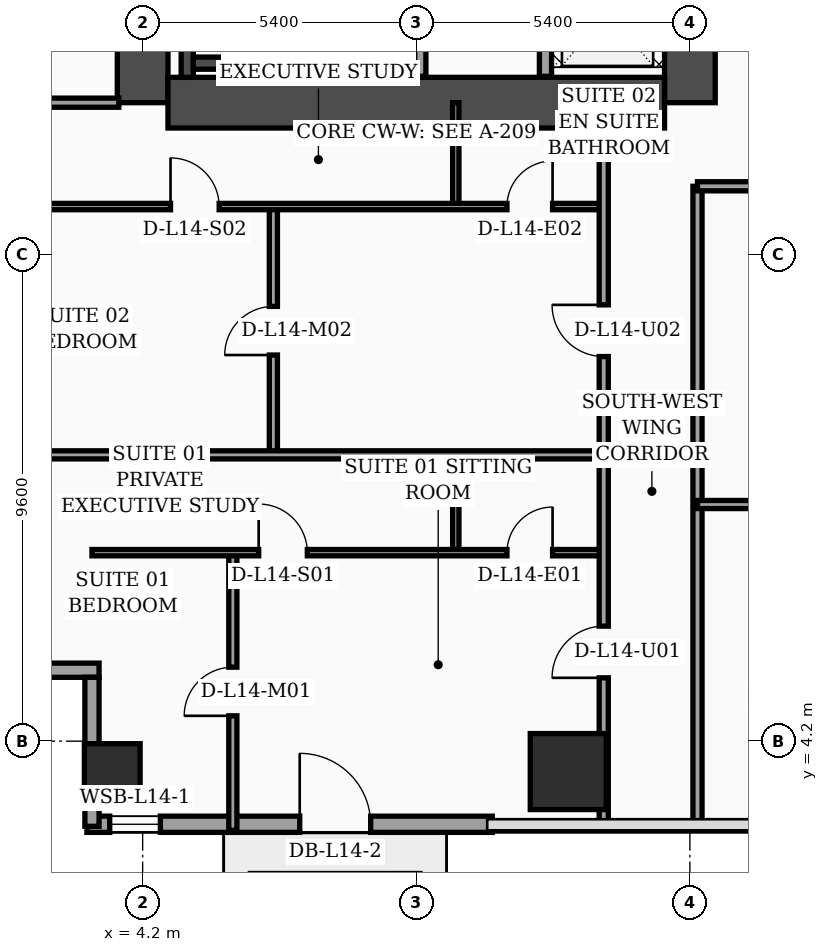
"""IFC4 building model, lengths in metres.
Left out: names, types, materials, properties, quantities, classifications, styles, units other than length and angle.
Written with IfcOpenShell. Run it as: python <this file> out.ifc"""

import sys

from ifc_helpers import new_model, si_unit, direction, frame, frame_2d, origin, origin_2d, place, context, subcontext, project, spatial, rectangle, hollow_rectangle, extrude, element, fill, save


model = new_model("IFC4")
c1 = context("Model", 3, precision=1e-05, world=origin(), true_north=direction((0.0, 1.0)))
c2 = subcontext(c1, "Body", "Model", "MODEL_VIEW")
j1 = project(units=[si_unit("LENGTHUNIT", "METRE"), si_unit("PLANEANGLEUNIT", "RADIAN")], contexts=[c1])
p1 = place(None, origin())
s1 = spatial("IfcSite", under=j1, at=p1, CompositionType="ELEMENT")
p2 = place(p1, origin())
s2 = spatial("IfcBuilding", under=s1, at=p2, CompositionType="ELEMENT")
p3 = place(p2, frame((0.0, 0.0, 62.2)))
s3 = spatial("IfcBuildingStorey", under=s2, at=p3, CompositionType="ELEMENT", Elevation=62.2)
p4 = place(p3, frame((4.2, 16.8, 0.0), z_axis=(0.0, 0.0, 1.0), x_axis=(0.0, 1.0, 0.0)))
e1 = element("IfcWall", 1, at=p4, inside=s3, PredefinedType="SHEAR", context=c2, shape_type="SweptSolid", body=[
    extrude(rectangle(XDim=21.6, YDim=1.0, at=frame_2d((10.8, 0.0))), origin(), (0.0, 0.0, 1.0), 3.56),
])
p5 = place(p3, frame((15.0, 16.8, 0.0), z_axis=(0.0, 0.0, 1.0), x_axis=(0.0, 1.0, 0.0)))
e2 = element("IfcWall", 2, at=p5, inside=s3, PredefinedType="SHEAR", context=c2, shape_type="SweptSolid", body=[
    extrude(rectangle(XDim=21.6, YDim=1.0, at=frame_2d((10.8, 0.0))), origin(), (0.0, 0.0, 1.0), 3.56),
])
p6 = place(p5, frame((8.65, 0.0, 0.0)))
e3 = element("IfcOpeningElement", 3, at=p6, cuts=e2, PredefinedType="OPENING", context=c2, shape_type="SweptSolid", body=[
    extrude(rectangle(XDim=1.1, YDim=2.2, at=frame_2d((0.55, 1.1))), frame((0.0, 0.51, 0.0), z_axis=(0.0, -1.0, 0.0), x_axis=(1.0, 0.0, 0.0)), (0.0, 0.0, 1.0), 1.02),
])
p7 = place(p5, frame((1.25, 0.0, 0.0)))
e4 = element("IfcOpeningElement", 4, at=p7, cuts=e2, PredefinedType="OPENING", context=c2, shape_type="SweptSolid", body=[
    extrude(rectangle(XDim=1.1, YDim=2.2, at=frame_2d((0.55, 1.1))), frame((0.0, 0.51, 0.0), z_axis=(0.0, -1.0, 0.0), x_axis=(1.0, 0.0, 0.0)), (0.0, 0.0, 1.0), 1.02),
])
p8 = place(p5, frame((3.8, 0.0, 0.0)))
e5 = element("IfcOpeningElement", 5, at=p8, cuts=e2, PredefinedType="OPENING", context=c2, shape_type="SweptSolid", body=[
    extrude(rectangle(XDim=1.1, YDim=2.2, at=frame_2d((0.55, 1.1))), frame((0.0, 0.51, 0.0), z_axis=(0.0, -1.0, 0.0), x_axis=(1.0, 0.0, 0.0)), (0.0, 0.0, 1.0), 1.02),
])
p9 = place(p5, frame((6.35, 0.0, 0.0)))
e6 = element("IfcOpeningElement", 6, at=p9, cuts=e2, PredefinedType="OPENING", context=c2, shape_type="SweptSolid", body=[
    extrude(rectangle(XDim=1.1, YDim=2.2, at=frame_2d((0.55, 1.1))), frame((0.0, 0.51, 0.0), z_axis=(0.0, -1.0, 0.0), x_axis=(1.0, 0.0, 0.0)), (0.0, 0.0, 1.0), 1.02),
])
p10 = place(p3, frame((4.7, 16.8, 0.0), z_axis=(0.0, 0.0, 1.0), x_axis=(1.0, 0.0, 0.0)))
e7 = element("IfcWall", 7, at=p10, inside=s3, PredefinedType="SHEAR", context=c2, shape_type="SweptSolid", body=[
    extrude(rectangle(XDim=9.8, YDim=1.0, at=frame_2d((4.9, 0.0))), origin(), (0.0, 0.0, 1.0), 3.56),
])
p11 = place(p3, frame((5.08, 17.3, 0.0), z_axis=(0.0, 0.0, 1.0), x_axis=(0.0, 1.0, 0.0)))
e8 = element("IfcWall", 8, at=p11, inside=s3, PredefinedType="SOLIDWALL", context=c2, shape_type="SweptSolid", body=[
    extrude(rectangle(XDim=9.49, YDim=0.24, at=frame_2d((4.745, 0.0))), origin(), (0.0, 0.0, 1.0), 3.56),
])
p12 = place(p3, frame((8.42, 17.3, 0.0), z_axis=(0.0, 0.0, 1.0), x_axis=(0.0, 1.0, 0.0)))
e9 = element("IfcWall", 9, at=p12, inside=s3, PredefinedType="SOLIDWALL", context=c2, shape_type="SweptSolid", body=[
    extrude(rectangle(XDim=9.49, YDim=0.24, at=frame_2d((4.745, 0.0))), origin(), (0.0, 0.0, 1.0), 3.56),
])
p13 = place(p12, frame((0.35, 0.0, 0.0)))
e10 = element("IfcOpeningElement", 10, at=p13, cuts=e9, PredefinedType="OPENING", context=c2, shape_type="SweptSolid", body=[
    extrude(rectangle(XDim=1.15, YDim=2.2, at=frame_2d((0.575, 1.1))), frame((0.0, 0.13, 0.0), z_axis=(0.0, -1.0, 0.0), x_axis=(1.0, 0.0, 0.0)), (0.0, 0.0, 1.0), 0.26),
])
p14 = place(p3, frame((5.2, 17.58, 0.0), z_axis=(0.0, 0.0, 1.0), x_axis=(1.0, 0.0, 0.0)))
e11 = element("IfcWall", 11, at=p14, inside=s3, PredefinedType="SOLIDWALL", context=c2, shape_type="SweptSolid", body=[
    extrude(rectangle(XDim=3.1, YDim=0.24, at=frame_2d((1.55, 0.0))), origin(), (0.0, 0.0, 1.0), 3.56),
])
p15 = place(p3, frame((3.6, 3.6, 0.0), z_axis=(0.0, 0.0, 1.0), x_axis=(1.0, 0.0, 0.0)))
e12 = element("IfcColumn", 12, at=p15, inside=s3, PredefinedType="COLUMN", context=c2, shape_type="SweptSolid", body=[
    extrude(hollow_rectangle(XDim=1.1, YDim=1.1, WallThickness=0.045, at=origin_2d()), origin(), (0.0, 0.0, 1.0), 3.56),
])
p16 = place(p3, frame((12.6, 3.6, 0.0), z_axis=(0.0, 0.0, 1.0), x_axis=(1.0, 0.0, 0.0)))
e13 = element("IfcColumn", 13, at=p16, inside=s3, PredefinedType="COLUMN", context=c2, shape_type="SweptSolid", body=[
    extrude(rectangle(XDim=1.5, YDim=1.5, at=origin_2d()), origin(), (0.0, 0.0, 1.0), 3.56),
])
p17 = place(p3, frame((3.1, 2.56, 0.0), z_axis=(0.0, 0.0, 1.0), x_axis=(1.0, 0.0, 0.0)))
e14 = element("IfcWall", 14, at=p17, inside=s3, PredefinedType="SOLIDWALL", context=c2, shape_type="SweptSolid", body=[
    extrude(rectangle(XDim=8.0, YDim=0.32, at=frame_2d((4.0, 0.0))), origin(), (0.0, 0.0, 1.0), 3.56),
])
p18 = place(p17, frame((0.45, 0.0, 0.75)))
e15 = element("IfcOpeningElement", 15, at=p18, cuts=e14, PredefinedType="OPENING", context=c2, shape_type="SweptSolid", body=[
    extrude(rectangle(XDim=1.0, YDim=1.6, at=frame_2d((0.5, 0.8))), frame((0.0, 0.17, 0.0), z_axis=(0.0, -1.0, 0.0), x_axis=(1.0, 0.0, 0.0)), (0.0, 0.0, 1.0), 0.34),
])
p19 = place(p17, frame((4.2, 0.0, 0.0)))
e16 = element("IfcOpeningElement", 16, at=p19, cuts=e14, PredefinedType="OPENING", context=c2, shape_type="SweptSolid", body=[
    extrude(rectangle(XDim=1.4, YDim=2.25, at=frame_2d((0.7, 1.125))), frame((0.0, 0.17, 0.0), z_axis=(0.0, -1.0, 0.0), x_axis=(1.0, 0.0, 0.0)), (0.0, 0.0, 1.0), 0.34),
])
p20 = place(p3, frame((0.12, 5.6, 0.0), z_axis=(0.0, 0.0, 1.0), x_axis=(1.0, 0.0, 0.0)))
e17 = element("IfcWall", 17, at=p20, inside=s3, PredefinedType="SOLIDWALL", context=c2, shape_type="SweptSolid", body=[
    extrude(rectangle(XDim=3.22, YDim=0.28, at=frame_2d((1.61, 0.0))), origin(), (0.0, 0.0, 1.0), 2.84),
])
p21 = place(p3, frame((3.2, 5.46, 0.0), z_axis=(0.0, 0.0, 1.0), x_axis=(0.0, -1.0, 0.0)))
e18 = element("IfcWall", 18, at=p21, inside=s3, PredefinedType="SOLIDWALL", context=c2, shape_type="SweptSolid", body=[
    extrude(rectangle(XDim=2.94, YDim=0.28, at=frame_2d((1.47, 0.0))), origin(), (0.0, 0.0, 1.0), 2.84),
])
p22 = place(p3, frame((9.68, 17.32, 0.0), z_axis=(0.0, 0.0, 1.0), x_axis=(0.0, 1.0, 0.0)))
e19 = element("IfcWall", 19, at=p22, inside=s3, PredefinedType="SOLIDWALL", context=c2, shape_type="SweptSolid", body=[
    extrude(rectangle(XDim=7.68, YDim=0.22, at=frame_2d((3.84, 0.0))), origin(), (0.0, 0.0, 1.0), 3.56),
])
p23 = place(p3, frame((12.15, 17.32, 0.0), z_axis=(0.0, 0.0, 1.0), x_axis=(0.0, 1.0, 0.0)))
e20 = element("IfcWall", 20, at=p23, inside=s3, PredefinedType="SOLIDWALL", context=c2, shape_type="SweptSolid", body=[
    extrude(rectangle(XDim=7.65, YDim=0.24, at=frame_2d((3.825, 0.0))), origin(), (0.0, 0.0, 1.0), 3.56),
])
p24 = place(p3, frame((0.08, 16.8, 0.0), z_axis=(0.0, 0.0, 1.0), x_axis=(1.0, 0.0, 0.0)))
e21 = element("IfcWall", 21, at=p24, inside=s3, PredefinedType="PARTITIONING", context=c2, shape_type="SweptSolid", body=[
    extrude(rectangle(XDim=3.65, YDim=0.18, at=frame_2d((1.825, 0.0))), origin(), (0.0, 0.0, 1.0), 2.84),
])
p25 = place(p3, frame((10.38, 7.92, 0.0), z_axis=(0.0, 0.0, 1.0), x_axis=(0.0, 1.0, 0.0)))
e22 = element("IfcWall", 22, at=p25, inside=s3, PredefinedType="PARTITIONING", context=c2, shape_type="SweptSolid", body=[
    extrude(rectangle(XDim=1.93, YDim=0.125, at=frame_2d((0.965, 0.0))), origin(), (0.0, 0.0, 1.0), 3.56),
])
p26 = place(p3, frame((5.98, 2.44, 0.0), z_axis=(0.0, 0.0, 1.0), x_axis=(0.0, 1.0, 0.0)))
e23 = element("IfcWall", 23, at=p26, inside=s3, PredefinedType="PARTITIONING", context=c2, shape_type="SweptSolid", body=[
    extrude(rectangle(XDim=5.48, YDim=0.16, at=frame_2d((2.74, 0.0))), origin(), (0.0, 0.0, 1.0), 3.04),
])
p27 = place(p26, frame((2.26, 0.0, 0.0)))
e24 = element("IfcOpeningElement", 24, at=p27, cuts=e23, PredefinedType="OPENING", context=c2, shape_type="SweptSolid", body=[
    extrude(rectangle(XDim=0.96, YDim=2.2, at=frame_2d((0.48, 1.1))), frame((0.0, 0.09, 0.0), z_axis=(0.0, -1.0, 0.0), x_axis=(1.0, 0.0, 0.0)), (0.0, 0.0, 1.0), 0.18),
])
p28 = place(p3, frame((3.2, 7.92, 0.0), z_axis=(0.0, 0.0, 1.0), x_axis=(1.0, 0.0, 0.0)))
e25 = element("IfcWall", 25, at=p28, inside=s3, PredefinedType="PARTITIONING", context=c2, shape_type="SweptSolid", body=[
    extrude(rectangle(XDim=10.1, YDim=0.125, at=frame_2d((5.05, 0.0))), origin(), (0.0, 0.0, 1.0), 2.84),
])
p29 = place(p28, frame((3.29, 0.0, 0.0)))
e26 = element("IfcOpeningElement", 26, at=p29, cuts=e25, PredefinedType="OPENING", context=c2, shape_type="SweptSolid", body=[
    extrude(rectangle(XDim=0.96, YDim=2.2, at=frame_2d((0.48, 1.1))), frame((0.0, 0.073, 0.0), z_axis=(0.0, -1.0, 0.0), x_axis=(1.0, 0.0, 0.0)), (0.0, 0.0, 1.0), 0.145),
])
p30 = place(p28, frame((8.19, 0.0, 0.0)))
e27 = element("IfcOpeningElement", 27, at=p30, cuts=e25, PredefinedType="OPENING", context=c2, shape_type="SweptSolid", body=[
    extrude(rectangle(XDim=0.9, YDim=2.15, at=frame_2d((0.45, 1.075))), frame((0.0, 0.073, 0.0), z_axis=(0.0, -1.0, 0.0), x_axis=(1.0, 0.0, 0.0)), (0.0, 0.0, 1.0), 0.145),
])
p31 = place(p3, frame((10.38, 14.75, 0.0), z_axis=(0.0, 0.0, 1.0), x_axis=(0.0, 1.0, 0.0)))
e28 = element("IfcWall", 28, at=p31, inside=s3, PredefinedType="PARTITIONING", context=c2, shape_type="SweptSolid", body=[
    extrude(rectangle(XDim=2.05, YDim=0.125, at=frame_2d((1.025, 0.0))), origin(), (0.0, 0.0, 1.0), 3.56),
])
p32 = place(p3, frame((6.78, 9.85, 0.0), z_axis=(0.0, 0.0, 1.0), x_axis=(0.0, 1.0, 0.0)))
e29 = element("IfcWall", 29, at=p32, inside=s3, PredefinedType="PARTITIONING", context=c2, shape_type="SweptSolid", body=[
    extrude(rectangle(XDim=4.9, YDim=0.16, at=frame_2d((2.45, 0.0))), origin(), (0.0, 0.0, 1.0), 3.14),
])
p33 = place(p32, frame((1.97, 0.0, 0.0)))
e30 = element("IfcOpeningElement", 30, at=p33, cuts=e29, PredefinedType="OPENING", context=c2, shape_type="SweptSolid", body=[
    extrude(rectangle(XDim=0.96, YDim=2.2, at=frame_2d((0.48, 1.1))), frame((0.0, 0.09, 0.0), z_axis=(0.0, -1.0, 0.0), x_axis=(1.0, 0.0, 0.0)), (0.0, 0.0, 1.0), 0.18),
])
p34 = place(p3, frame((0.08, 14.75, 0.0), z_axis=(0.0, 0.0, 1.0), x_axis=(1.0, 0.0, 0.0)))
e31 = element("IfcWall", 31, at=p34, inside=s3, PredefinedType="PARTITIONING", context=c2, shape_type="SweptSolid", body=[
    extrude(rectangle(XDim=13.22, YDim=0.125, at=frame_2d((6.61, 0.0))), origin(), (0.0, 0.0, 1.0), 2.84),
])
p35 = place(p34, frame((4.67, 0.0, 0.0)))
e32 = element("IfcOpeningElement", 32, at=p35, cuts=e31, PredefinedType="OPENING", context=c2, shape_type="SweptSolid", body=[
    extrude(rectangle(XDim=0.96, YDim=2.2, at=frame_2d((0.48, 1.1))), frame((0.0, 0.073, 0.0), z_axis=(0.0, -1.0, 0.0), x_axis=(1.0, 0.0, 0.0)), (0.0, 0.0, 1.0), 0.145),
])
p36 = place(p34, frame((11.31, 0.0, 0.0)))
e33 = element("IfcOpeningElement", 33, at=p36, cuts=e31, PredefinedType="OPENING", context=c2, shape_type="SweptSolid", body=[
    extrude(rectangle(XDim=0.9, YDim=2.15, at=frame_2d((0.45, 1.075))), frame((0.0, 0.073, 0.0), z_axis=(0.0, -1.0, 0.0), x_axis=(1.0, 0.0, 0.0)), (0.0, 0.0, 1.0), 0.145),
])
p37 = place(p3, frame((0.08, 9.85, 0.0), z_axis=(0.0, 0.0, 1.0), x_axis=(1.0, 0.0, 0.0)))
e34 = element("IfcWall", 34, at=p37, inside=s3, PredefinedType="PARTITIONING", context=c2, shape_type="SweptSolid", body=[
    extrude(rectangle(XDim=13.22, YDim=0.16, at=frame_2d((6.61, 0.0))), origin(), (0.0, 0.0, 1.0), 2.84),
])
p38 = place(p3, frame((13.3, 2.44, 0.0), z_axis=(0.0, 0.0, 1.0), x_axis=(0.0, 1.0, 0.0)))
e35 = element("IfcWall", 35, at=p38, inside=s3, PredefinedType="PARTITIONING", context=c2, shape_type="SweptSolid", body=[
    extrude(rectangle(XDim=14.36, YDim=0.18, at=frame_2d((7.18, 0.0))), origin(), (0.0, 0.0, 1.0), 3.04),
])
p39 = place(p38, frame((3.01, 0.0, 0.0)))
e36 = element("IfcOpeningElement", 36, at=p39, cuts=e35, PredefinedType="OPENING", context=c2, shape_type="SweptSolid", body=[
    extrude(rectangle(XDim=1.02, YDim=2.2, at=frame_2d((0.51, 1.1))), frame((0.0, 0.1, 0.0), z_axis=(0.0, -1.0, 0.0), x_axis=(1.0, 0.0, 0.0)), (0.0, 0.0, 1.0), 0.2),
])
p40 = place(p38, frame((9.35, 0.0, 0.0)))
e37 = element("IfcOpeningElement", 37, at=p40, cuts=e35, PredefinedType="OPENING", context=c2, shape_type="SweptSolid", body=[
    extrude(rectangle(XDim=1.02, YDim=2.2, at=frame_2d((0.51, 1.1))), frame((0.0, 0.1, 0.0), z_axis=(0.0, -1.0, 0.0), x_axis=(1.0, 0.0, 0.0)), (0.0, 0.0, 1.0), 0.2),
])
p41 = place(p3, frame((15.15, 2.44, 0.0), z_axis=(0.0, 0.0, 1.0), x_axis=(0.0, 1.0, 0.0)))
e38 = element("IfcWall", 38, at=p41, inside=s3, PredefinedType="PARTITIONING", context=c2, shape_type="SweptSolid", body=[
    extrude(rectangle(XDim=12.71, YDim=0.18, at=frame_2d((6.355, 0.0))), origin(), (0.0, 0.0, 1.0), 3.04),
])
p42 = place(p3, frame((15.15, 8.87, 0.0), z_axis=(0.0, 0.0, 1.0), x_axis=(1.0, 0.0, 0.0)))
e39 = element("IfcWall", 39, at=p42, inside=s3, PredefinedType="PARTITIONING", context=c2, shape_type="SweptSolid", body=[
    extrude(rectangle(XDim=4.45, YDim=0.16, at=frame_2d((2.225, 0.0))), origin(), (0.0, 0.0, 1.0), 3.56),
])
p43 = place(p42, frame((1.75, 0.0, 0.0)))
e40 = element("IfcOpeningElement", 40, at=p43, cuts=e39, PredefinedType="OPENING", context=c2, shape_type="SweptSolid", body=[
    extrude(rectangle(XDim=0.96, YDim=2.2, at=frame_2d((0.48, 1.1))), frame((0.0, 0.09, 0.0), z_axis=(0.0, -1.0, 0.0), x_axis=(1.0, 0.0, 0.0)), (0.0, 0.0, 1.0), 0.18),
])
p44 = place(p3, frame((15.15, 15.15, 0.0), z_axis=(0.0, 0.0, 1.0), x_axis=(1.0, 0.0, 0.0)))
e41 = element("IfcWall", 41, at=p44, inside=s3, PredefinedType="PARTITIONING", context=c2, shape_type="SweptSolid", body=[
    extrude(rectangle(XDim=6.45, YDim=0.18, at=frame_2d((3.225, 0.0))), origin(), (0.0, 0.0, 1.0), 2.34),
])
p45 = place(p44, frame((1.74, 0.0, 0.0)))
e42 = element("IfcOpeningElement", 42, at=p45, cuts=e41, PredefinedType="OPENING", context=c2, shape_type="SweptSolid", body=[
    extrude(rectangle(XDim=1.02, YDim=2.2, at=frame_2d((0.51, 1.1))), frame((0.0, 0.1, 0.0), z_axis=(0.0, -1.0, 0.0), x_axis=(1.0, 0.0, 0.0)), (0.0, 0.0, 1.0), 0.2),
])
p46 = place(p18, origin())
e43 = element("IfcWindow", 43, at=p46, inside=s3, PartitioningType="SINGLE_PANEL", PredefinedType="WINDOW", context=c2, shape_type="SweptSolid", body=[
    extrude(rectangle(XDim=1.0, YDim=1.6, at=frame_2d((0.5, 0.8))), frame((0.0, 0.03, 0.0), z_axis=(0.0, -1.0, 0.0), x_axis=(1.0, 0.0, 0.0)), (0.0, 0.0, 1.0), 0.06),
])
fill(e15, e43)
p47 = place(p19, origin())
e44 = element("IfcDoor", 44, at=p47, inside=s3, OperationType="SINGLE_SWING_LEFT", PredefinedType="DOOR", context=c2, shape_type="SweptSolid", body=[
    extrude(rectangle(XDim=1.4, YDim=2.25, at=frame_2d((0.7, 1.125))), frame((0.0, 0.025, 0.0), z_axis=(0.0, -1.0, 0.0), x_axis=(1.0, 0.0, 0.0)), (0.0, 0.0, 1.0), 0.05),
])
fill(e16, e44)
p48 = place(p27, origin())
e45 = element("IfcDoor", 45, at=p48, inside=s3, OperationType="SINGLE_SWING_LEFT", PredefinedType="DOOR", context=c2, shape_type="SweptSolid", body=[
    extrude(rectangle(XDim=0.96, YDim=2.2, at=frame_2d((0.48, 1.1))), frame((0.0, 0.025, 0.0), z_axis=(0.0, -1.0, 0.0), x_axis=(1.0, 0.0, 0.0)), (0.0, 0.0, 1.0), 0.05),
])
fill(e24, e45)
p49 = place(p29, origin())
e46 = element("IfcDoor", 46, at=p49, inside=s3, OperationType="SINGLE_SWING_LEFT", PredefinedType="DOOR", context=c2, shape_type="SweptSolid", body=[
    extrude(rectangle(XDim=0.96, YDim=2.2, at=frame_2d((0.48, 1.1))), frame((0.0, 0.025, 0.0), z_axis=(0.0, -1.0, 0.0), x_axis=(1.0, 0.0, 0.0)), (0.0, 0.0, 1.0), 0.05),
])
fill(e26, e46)
p50 = place(p30, origin())
e47 = element("IfcDoor", 47, at=p50, inside=s3, OperationType="SINGLE_SWING_RIGHT", PredefinedType="DOOR", context=c2, shape_type="SweptSolid", body=[
    extrude(rectangle(XDim=0.9, YDim=2.15, at=frame_2d((0.45, 1.075))), frame((0.0, 0.025, 0.0), z_axis=(0.0, -1.0, 0.0), x_axis=(1.0, 0.0, 0.0)), (0.0, 0.0, 1.0), 0.05),
])
fill(e27, e47)
p51 = place(p33, origin())
e48 = element("IfcDoor", 48, at=p51, inside=s3, OperationType="SINGLE_SWING_LEFT", PredefinedType="DOOR", context=c2, shape_type="SweptSolid", body=[
    extrude(rectangle(XDim=0.96, YDim=2.2, at=frame_2d((0.48, 1.1))), frame((0.0, 0.025, 0.0), z_axis=(0.0, -1.0, 0.0), x_axis=(1.0, 0.0, 0.0)), (0.0, 0.0, 1.0), 0.05),
])
fill(e30, e48)
p52 = place(p35, origin())
e49 = element("IfcDoor", 49, at=p52, inside=s3, OperationType="SINGLE_SWING_LEFT", PredefinedType="DOOR", context=c2, shape_type="SweptSolid", body=[
    extrude(rectangle(XDim=0.96, YDim=2.2, at=frame_2d((0.48, 1.1))), frame((0.0, 0.025, 0.0), z_axis=(0.0, -1.0, 0.0), x_axis=(1.0, 0.0, 0.0)), (0.0, 0.0, 1.0), 0.05),
])
fill(e32, e49)
p53 = place(p36, origin())
e50 = element("IfcDoor", 50, at=p53, inside=s3, OperationType="SINGLE_SWING_RIGHT", PredefinedType="DOOR", context=c2, shape_type="SweptSolid", body=[
    extrude(rectangle(XDim=0.9, YDim=2.15, at=frame_2d((0.45, 1.075))), frame((0.0, 0.025, 0.0), z_axis=(0.0, -1.0, 0.0), x_axis=(1.0, 0.0, 0.0)), (0.0, 0.0, 1.0), 0.05),
])
fill(e33, e50)
p54 = place(p39, origin())
e51 = element("IfcDoor", 51, at=p54, inside=s3, OperationType="SINGLE_SWING_LEFT", PredefinedType="DOOR", context=c2, shape_type="SweptSolid", body=[
    extrude(rectangle(XDim=1.02, YDim=2.2, at=frame_2d((0.51, 1.1))), frame((0.0, 0.025, 0.0), z_axis=(0.0, -1.0, 0.0), x_axis=(1.0, 0.0, 0.0)), (0.0, 0.0, 1.0), 0.05),
])
fill(e36, e51)
p55 = place(p40, origin())
e52 = element("IfcDoor", 52, at=p55, inside=s3, OperationType="SINGLE_SWING_RIGHT", PredefinedType="DOOR", context=c2, shape_type="SweptSolid", body=[
    extrude(rectangle(XDim=1.02, YDim=2.2, at=frame_2d((0.51, 1.1))), frame((0.0, 0.025, 0.0), z_axis=(0.0, -1.0, 0.0), x_axis=(1.0, 0.0, 0.0)), (0.0, 0.0, 1.0), 0.05),
])
fill(e37, e52)
p56 = place(p13, origin())
e53 = element("IfcDoor", 53, at=p56, inside=s3, OperationType="SINGLE_SWING_LEFT", PredefinedType="DOOR", context=c2, shape_type="SweptSolid", body=[
    extrude(rectangle(XDim=1.15, YDim=2.2, at=frame_2d((0.575, 1.1))), frame((0.0, 0.025, 0.0), z_axis=(0.0, -1.0, 0.0), x_axis=(1.0, 0.0, 0.0)), (0.0, 0.0, 1.0), 0.05),
])
fill(e10, e53)
save(model, sys.argv[1])
